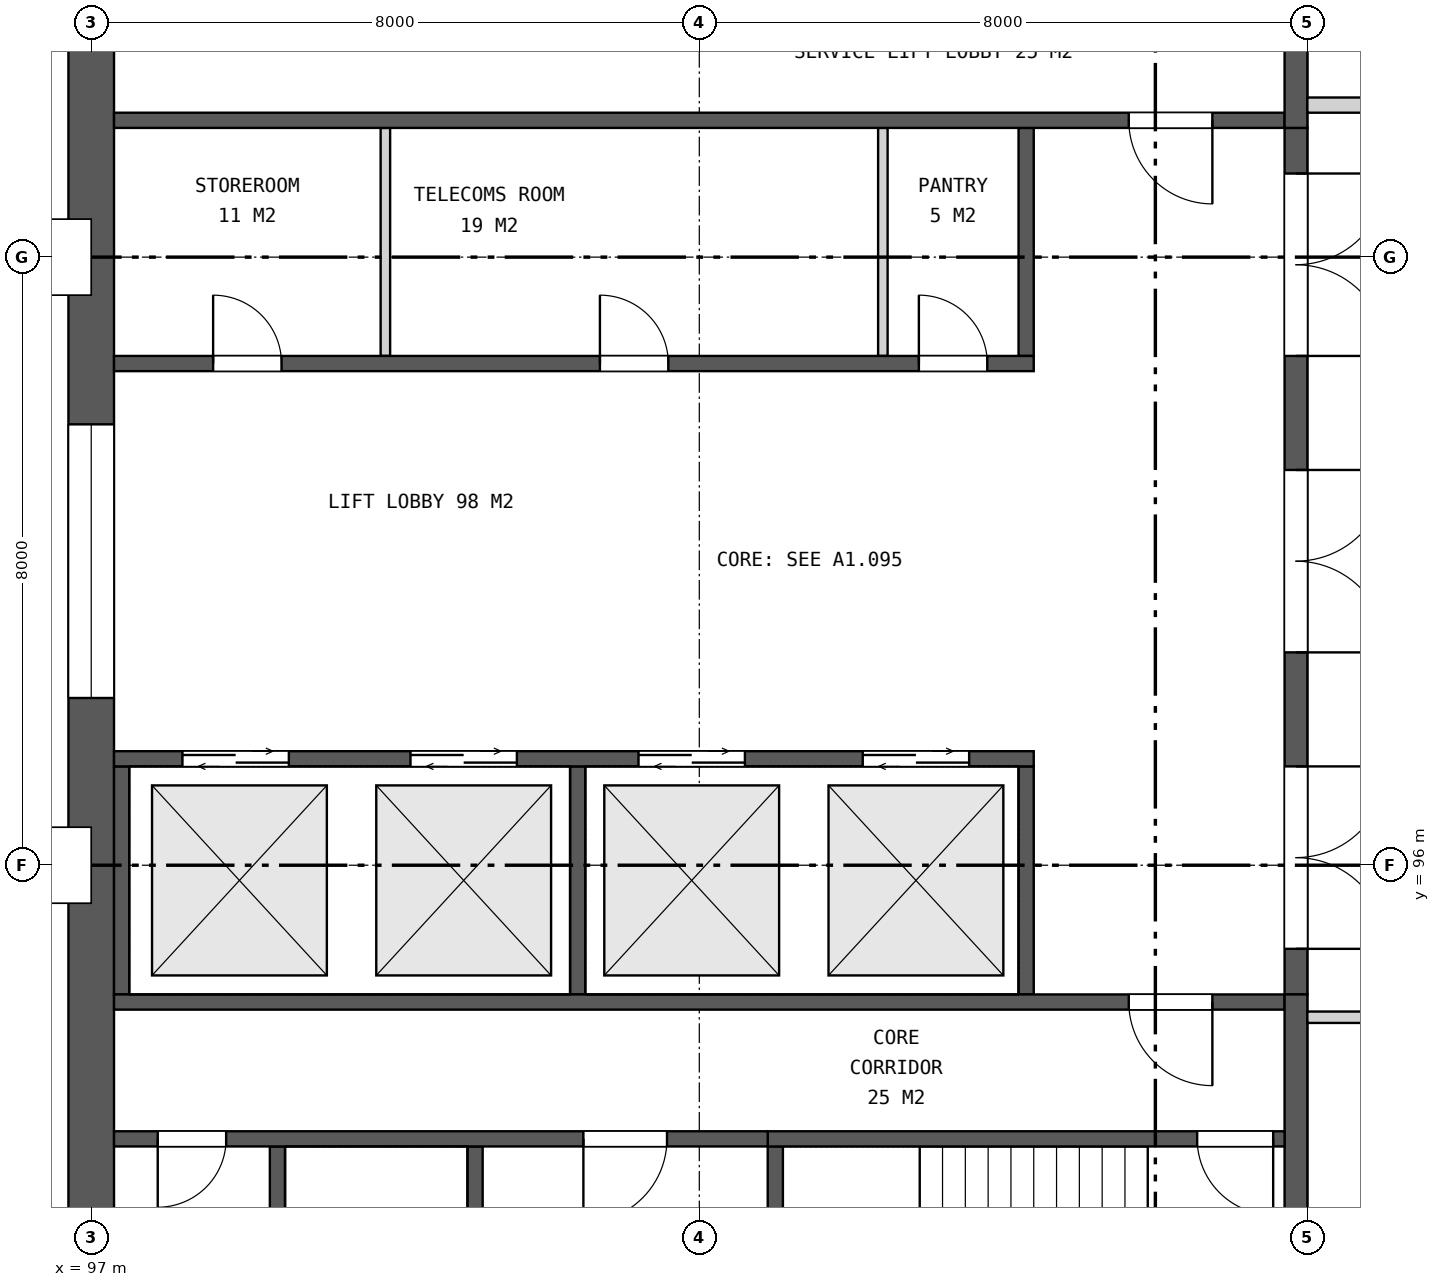
"""IFC4 building model, lengths in metres.
Left out: names, types, materials, properties, quantities, classifications, styles, units other than length and angle.
Written with IfcOpenShell. Run it as: python <this file> out.ifc"""

import sys

from ifc_helpers import new_model, si_unit, direction, frame, frame_2d, origin, place, context, subcontext, project, spatial, rectangle, extrude, element, fill, save


model = new_model("IFC4")
c1 = context("Model", 3, precision=1e-05, world=origin(), true_north=direction((0.0, 1.0)))
c2 = subcontext(c1, "Body", "Model", "MODEL_VIEW")
j1 = project(units=[si_unit("LENGTHUNIT", "METRE"), si_unit("PLANEANGLEUNIT", "RADIAN")], contexts=[c1])
p1 = place(None, origin())
s1 = spatial("IfcSite", under=j1, at=p1, CompositionType="ELEMENT")
p2 = place(p1, origin())
s2 = spatial("IfcBuilding", under=s1, at=p2, CompositionType="ELEMENT")
p3 = place(p2, frame((0.0, 0.0, 233.5)))
s3 = spatial("IfcBuildingStorey", under=s2, at=p3, CompositionType="ELEMENT", Elevation=233.5)
p4 = place(p3, frame((97.0, 111.7, 0.0), z_axis=(0.0, 0.0, 1.0), x_axis=(0.0, -1.0, 0.0)))
e1 = element("IfcWall", 1, at=p4, inside=s3, PredefinedType="SHEAR", context=c2, shape_type="SweptSolid", body=[
    extrude(rectangle(XDim=23.4, YDim=0.6, at=frame_2d((11.7, 0.0))), origin(), (0.0, 0.0, 1.0), 4.2),
])
p5 = place(p4, frame((9.9, 0.0, 0.15)))
e2 = element("IfcOpeningElement", 2, at=p5, cuts=e1, PredefinedType="OPENING", context=c2, shape_type="SweptSolid", body=[
    extrude(rectangle(XDim=3.6, YDim=3.0, at=frame_2d((1.8, 1.5))), frame((0.0, 0.31, 0.0), z_axis=(0.0, -1.0, 0.0), x_axis=(1.0, 0.0, 0.0)), (0.0, 0.0, 1.0), 0.62),
])
p6 = place(p3, frame((112.85, 105.7, 0.0), z_axis=(0.0, 0.0, 1.0), x_axis=(0.0, -1.0, 0.0)))
e3 = element("IfcWall", 3, at=p6, inside=s3, PredefinedType="SHEAR", context=c2, shape_type="SweptSolid", body=[
    extrude(rectangle(XDim=11.4, YDim=0.3, at=frame_2d((5.7, 0.0))), origin(), (0.0, 0.0, 1.0), 4.2),
])
p7 = place(p6, frame((0.6, 0.0, 0.0)))
e4 = element("IfcOpeningElement", 4, at=p7, cuts=e3, PredefinedType="OPENING", context=c2, shape_type="SweptSolid", body=[
    extrude(rectangle(XDim=2.4, YDim=2.4, at=frame_2d((1.2, 1.2))), frame((0.0, 0.16, 0.0), z_axis=(0.0, -1.0, 0.0), x_axis=(1.0, 0.0, 0.0)), (0.0, 0.0, 1.0), 0.32),
])
p8 = place(p6, frame((4.5, 0.0, 0.0)))
e5 = element("IfcOpeningElement", 5, at=p8, cuts=e3, PredefinedType="OPENING", context=c2, shape_type="SweptSolid", body=[
    extrude(rectangle(XDim=2.4, YDim=2.4, at=frame_2d((1.2, 1.2))), frame((0.0, 0.16, 0.0), z_axis=(0.0, -1.0, 0.0), x_axis=(1.0, 0.0, 0.0)), (0.0, 0.0, 1.0), 0.32),
])
p9 = place(p6, frame((8.4, 0.0, 0.0)))
e6 = element("IfcOpeningElement", 6, at=p9, cuts=e3, PredefinedType="OPENING", context=c2, shape_type="SweptSolid", body=[
    extrude(rectangle(XDim=2.4, YDim=2.4, at=frame_2d((1.2, 1.2))), frame((0.0, 0.16, 0.0), z_axis=(0.0, -1.0, 0.0), x_axis=(1.0, 0.0, 0.0)), (0.0, 0.0, 1.0), 0.32),
])
for number, where, z_axis, x_axis in (
    (7, (109.3, 97.3, 0.0), (0.0, 0.0, 1.0), (0.0, -1.0, 0.0)),
    (8, (103.4, 97.3, 0.0), (0.0, 0.0, 1.0), (0.0, -1.0, 0.0)),
    (9, (97.4, 97.3, 0.0), (0.0, 0.0, 1.0), (0.0, -1.0, 0.0)),
):
    element("IfcWall", number, at=place(p3, frame(where, z_axis=z_axis, x_axis=x_axis)), inside=s3, PredefinedType="SHEAR", context=c2, shape_type="SweptSolid", body=[
        extrude(rectangle(XDim=3.0, YDim=0.2, at=frame_2d((1.5, 0.0))), origin(), (0.0, 0.0, 1.0), 4.2),
    ])
p10 = place(p3, frame((109.4, 97.4, 0.0), z_axis=(0.0, 0.0, 1.0), x_axis=(-1.0, 0.0, 0.0)))
e10 = element("IfcWall", 10, at=p10, inside=s3, PredefinedType="SHEAR", context=c2, shape_type="SweptSolid", body=[
    extrude(rectangle(XDim=12.1, YDim=0.2, at=frame_2d((6.05, 0.0))), origin(), (0.0, 0.0, 1.0), 4.2),
])
p11 = place(p10, frame((0.85, 0.0, 0.0)))
e11 = element("IfcOpeningElement", 11, at=p11, cuts=e10, PredefinedType="OPENING", context=c2, shape_type="SweptSolid", body=[
    extrude(rectangle(XDim=1.4, YDim=2.1, at=frame_2d((0.7, 1.05))), frame((0.0, 0.11, 0.0), z_axis=(0.0, -1.0, 0.0), x_axis=(1.0, 0.0, 0.0)), (0.0, 0.0, 1.0), 0.22),
])
p12 = place(p10, frame((3.8, 0.0, 0.0)))
e12 = element("IfcOpeningElement", 12, at=p12, cuts=e10, PredefinedType="OPENING", context=c2, shape_type="SweptSolid", body=[
    extrude(rectangle(XDim=1.4, YDim=2.1, at=frame_2d((0.7, 1.05))), frame((0.0, 0.11, 0.0), z_axis=(0.0, -1.0, 0.0), x_axis=(1.0, 0.0, 0.0)), (0.0, 0.0, 1.0), 0.22),
])
p13 = place(p10, frame((6.8, 0.0, 0.0)))
e13 = element("IfcOpeningElement", 13, at=p13, cuts=e10, PredefinedType="OPENING", context=c2, shape_type="SweptSolid", body=[
    extrude(rectangle(XDim=1.4, YDim=2.1, at=frame_2d((0.7, 1.05))), frame((0.0, 0.11, 0.0), z_axis=(0.0, -1.0, 0.0), x_axis=(1.0, 0.0, 0.0)), (0.0, 0.0, 1.0), 0.22),
])
p14 = place(p10, frame((9.8, 0.0, 0.0)))
e14 = element("IfcOpeningElement", 14, at=p14, cuts=e10, PredefinedType="OPENING", context=c2, shape_type="SweptSolid", body=[
    extrude(rectangle(XDim=1.4, YDim=2.1, at=frame_2d((0.7, 1.05))), frame((0.0, 0.11, 0.0), z_axis=(0.0, -1.0, 0.0), x_axis=(1.0, 0.0, 0.0)), (0.0, 0.0, 1.0), 0.22),
])
p15 = place(p3, frame((109.3, 105.7, 0.0), z_axis=(0.0, 0.0, 1.0), x_axis=(0.0, -1.0, 0.0)))
e15 = element("IfcWall", 15, at=p15, inside=s3, PredefinedType="SHEAR", context=c2, shape_type="SweptSolid", body=[
    extrude(rectangle(XDim=3.0, YDim=0.2, at=frame_2d((1.5, 0.0))), origin(), (0.0, 0.0, 1.0), 4.2),
])
for number, where, z_axis, x_axis in (
    (16, (107.415, 105.7, 0.0), (0.0, 0.0, 1.0), (0.0, -1.0, 0.0)),
    (17, (100.87, 105.7, 0.0), (0.0, 0.0, 1.0), (0.0, -1.0, 0.0)),
):
    element("IfcWall", number, at=place(p3, frame(where, z_axis=z_axis, x_axis=x_axis)), inside=s3, PredefinedType="PARTITIONING", context=c2, shape_type="SweptSolid", body=[
        extrude(rectangle(XDim=3.0, YDim=0.125, at=frame_2d((1.5, 0.0))), origin(), (0.0, 0.0, 1.0), 4.2),
    ])
p16 = place(p3, frame((109.4, 102.6, 0.0), z_axis=(0.0, 0.0, 1.0), x_axis=(-1.0, 0.0, 0.0)))
e18 = element("IfcWall", 18, at=p16, inside=s3, PredefinedType="SHEAR", context=c2, shape_type="SweptSolid", body=[
    extrude(rectangle(XDim=12.1, YDim=0.2, at=frame_2d((6.05, 0.0))), origin(), (0.0, 0.0, 1.0), 4.2),
])
p17 = place(p16, frame((0.611, 0.0, 0.0)))
e19 = element("IfcOpeningElement", 19, at=p17, cuts=e18, PredefinedType="OPENING", context=c2, shape_type="SweptSolid", body=[
    extrude(rectangle(XDim=0.9, YDim=2.1, at=frame_2d((0.45, 1.05))), frame((0.0, 0.11, 0.0), z_axis=(0.0, -1.0, 0.0), x_axis=(1.0, 0.0, 0.0)), (0.0, 0.0, 1.0), 0.22),
])
p18 = place(p16, frame((4.808, 0.0, 0.0)))
e20 = element("IfcOpeningElement", 20, at=p18, cuts=e18, PredefinedType="OPENING", context=c2, shape_type="SweptSolid", body=[
    extrude(rectangle(XDim=0.9, YDim=2.1, at=frame_2d((0.45, 1.05))), frame((0.0, 0.11, 0.0), z_axis=(0.0, -1.0, 0.0), x_axis=(1.0, 0.0, 0.0)), (0.0, 0.0, 1.0), 0.22),
])
p19 = place(p16, frame((9.896, 0.0, 0.0)))
e21 = element("IfcOpeningElement", 21, at=p19, cuts=e18, PredefinedType="OPENING", context=c2, shape_type="SweptSolid", body=[
    extrude(rectangle(XDim=0.9, YDim=2.1, at=frame_2d((0.45, 1.05))), frame((0.0, 0.11, 0.0), z_axis=(0.0, -1.0, 0.0), x_axis=(1.0, 0.0, 0.0)), (0.0, 0.0, 1.0), 0.22),
])
p20 = place(p3, frame((112.7, 94.2, 0.0), z_axis=(0.0, 0.0, 1.0), x_axis=(-1.0, 0.0, 0.0)))
e22 = element("IfcWall", 22, at=p20, inside=s3, PredefinedType="SHEAR", context=c2, shape_type="SweptSolid", body=[
    extrude(rectangle(XDim=15.4, YDim=0.2, at=frame_2d((7.7, 0.0))), origin(), (0.0, 0.0, 1.0), 4.2),
])
p21 = place(p20, frame((0.95, 0.0, 0.0)))
e23 = element("IfcOpeningElement", 23, at=p21, cuts=e22, PredefinedType="OPENING", context=c2, shape_type="SweptSolid", body=[
    extrude(rectangle(XDim=1.1, YDim=2.1, at=frame_2d((0.55, 1.05))), frame((0.0, 0.11, 0.0), z_axis=(0.0, -1.0, 0.0), x_axis=(1.0, 0.0, 0.0)), (0.0, 0.0, 1.0), 0.22),
])
p22 = place(p3, frame((112.85, 94.3, 0.0), z_axis=(0.0, 0.0, 1.0), x_axis=(0.0, -1.0, 0.0)))
e24 = element("IfcWall", 24, at=p22, inside=s3, PredefinedType="SHEAR", context=c2, shape_type="SweptSolid", body=[
    extrude(rectangle(XDim=6.0, YDim=0.3, at=frame_2d((3.0, 0.0))), origin(), (0.0, 0.0, 1.0), 4.2),
])
p23 = place(p3, frame((106.0, 92.3, 0.0), z_axis=(0.0, 0.0, 1.0), x_axis=(0.0, -1.0, 0.0)))
e25 = element("IfcWall", 25, at=p23, inside=s3, PredefinedType="SHEAR", context=c2, shape_type="SweptSolid", body=[
    extrude(rectangle(XDim=4.0, YDim=0.2, at=frame_2d((2.0, 0.0))), origin(), (0.0, 0.0, 1.0), 4.2),
])
p24 = place(p3, frame((102.05, 92.3, 0.0), z_axis=(0.0, 0.0, 1.0), x_axis=(0.0, -1.0, 0.0)))
e26 = element("IfcWall", 26, at=p24, inside=s3, PredefinedType="SHEAR", context=c2, shape_type="SweptSolid", body=[
    extrude(rectangle(XDim=4.0, YDim=0.2, at=frame_2d((2.0, 0.0))), origin(), (0.0, 0.0, 1.0), 4.2),
])
p25 = place(p24, frame((1.4, 0.0, 0.0)))
e27 = element("IfcOpeningElement", 27, at=p25, cuts=e26, PredefinedType="OPENING", context=c2, shape_type="SweptSolid", body=[
    extrude(rectangle(XDim=1.2, YDim=2.1, at=frame_2d((0.6, 1.05))), frame((0.0, 0.11, 0.0), z_axis=(0.0, -1.0, 0.0), x_axis=(1.0, 0.0, 0.0)), (0.0, 0.0, 1.0), 0.22),
])
p26 = place(p3, frame((99.45, 92.3, 0.0), z_axis=(0.0, 0.0, 1.0), x_axis=(0.0, -1.0, 0.0)))
e28 = element("IfcWall", 28, at=p26, inside=s3, PredefinedType="SHEAR", context=c2, shape_type="SweptSolid", body=[
    extrude(rectangle(XDim=4.0, YDim=0.2, at=frame_2d((2.0, 0.0))), origin(), (0.0, 0.0, 1.0), 4.2),
])
p27 = place(p3, frame((112.7, 92.4, 0.0), z_axis=(0.0, 0.0, 1.0), x_axis=(-1.0, 0.0, 0.0)))
e29 = element("IfcWall", 29, at=p27, inside=s3, PredefinedType="SHEAR", context=c2, shape_type="SweptSolid", body=[
    extrude(rectangle(XDim=6.8, YDim=0.2, at=frame_2d((3.4, 0.0))), origin(), (0.0, 0.0, 1.0), 4.2),
])
p28 = place(p27, frame((0.15, 0.0, 0.0)))
e30 = element("IfcOpeningElement", 30, at=p28, cuts=e29, PredefinedType="OPENING", context=c2, shape_type="SweptSolid", body=[
    extrude(rectangle(XDim=1.0, YDim=2.1, at=frame_2d((0.5, 1.05))), frame((0.0, 0.11, 0.0), z_axis=(0.0, -1.0, 0.0), x_axis=(1.0, 0.0, 0.0)), (0.0, 0.0, 1.0), 0.22),
])
p29 = place(p3, frame((105.9, 92.4, 0.0), z_axis=(0.0, 0.0, 1.0), x_axis=(-1.0, 0.0, 0.0)))
e31 = element("IfcWall", 31, at=p29, inside=s3, PredefinedType="SHEAR", context=c2, shape_type="SweptSolid", body=[
    extrude(rectangle(XDim=8.6, YDim=0.2, at=frame_2d((4.3, 0.0))), origin(), (0.0, 0.0, 1.0), 4.2),
])
p30 = place(p29, frame((1.325, 0.0, 0.0)))
e32 = element("IfcOpeningElement", 32, at=p30, cuts=e31, PredefinedType="OPENING", context=c2, shape_type="SweptSolid", body=[
    extrude(rectangle(XDim=1.1, YDim=2.1, at=frame_2d((0.55, 1.05))), frame((0.0, 0.11, 0.0), z_axis=(0.0, -1.0, 0.0), x_axis=(1.0, 0.0, 0.0)), (0.0, 0.0, 1.0), 0.22),
])
p31 = place(p29, frame((7.125, 0.0, 0.0)))
e33 = element("IfcOpeningElement", 33, at=p31, cuts=e31, PredefinedType="OPENING", context=c2, shape_type="SweptSolid", body=[
    extrude(rectangle(XDim=0.9, YDim=2.1, at=frame_2d((0.45, 1.05))), frame((0.0, 0.11, 0.0), z_axis=(0.0, -1.0, 0.0), x_axis=(1.0, 0.0, 0.0)), (0.0, 0.0, 1.0), 0.22),
])
p32 = place(p3, frame((112.7, 105.8, 0.0), z_axis=(0.0, 0.0, 1.0), x_axis=(-1.0, 0.0, 0.0)))
e34 = element("IfcWall", 34, at=p32, inside=s3, PredefinedType="SHEAR", context=c2, shape_type="SweptSolid", body=[
    extrude(rectangle(XDim=15.4, YDim=0.2, at=frame_2d((7.7, 0.0))), origin(), (0.0, 0.0, 1.0), 4.2),
])
p33 = place(p32, frame((0.95, 0.0, 0.0)))
e35 = element("IfcOpeningElement", 35, at=p33, cuts=e34, PredefinedType="OPENING", context=c2, shape_type="SweptSolid", body=[
    extrude(rectangle(XDim=1.1, YDim=2.1, at=frame_2d((0.55, 1.05))), frame((0.0, 0.11, 0.0), z_axis=(0.0, -1.0, 0.0), x_axis=(1.0, 0.0, 0.0)), (0.0, 0.0, 1.0), 0.22),
])
p34 = place(p3, frame((112.85, 111.7, 0.0), z_axis=(0.0, 0.0, 1.0), x_axis=(0.0, -1.0, 0.0)))
e36 = element("IfcWall", 36, at=p34, inside=s3, PredefinedType="SHEAR", context=c2, shape_type="SweptSolid", body=[
    extrude(rectangle(XDim=6.0, YDim=0.3, at=frame_2d((3.0, 0.0))), origin(), (0.0, 0.0, 1.0), 4.2),
])
p35 = place(p3, frame((113.0, 94.0, 0.0), z_axis=(0.0, 0.0, 1.0), x_axis=(1.0, 0.0, 0.0)))
e37 = element("IfcWall", 37, at=p35, inside=s3, PredefinedType="PARTITIONING", context=c2, shape_type="SweptSolid", body=[
    extrude(rectangle(XDim=5.525, YDim=0.15, at=frame_2d((2.762, 0.0))), origin(), (0.0, 0.0, 1.0), 3.255),
])
p36 = place(p3, frame((113.0, 106.0, 0.0), z_axis=(0.0, 0.0, 1.0), x_axis=(1.0, 0.0, 0.0)))
e38 = element("IfcWall", 38, at=p36, inside=s3, PredefinedType="SOLIDWALL", context=c2, shape_type="SweptSolid", body=[
    extrude(rectangle(XDim=5.5, YDim=0.2, at=frame_2d((2.75, 0.0))), origin(), (0.0, 0.0, 1.0), 3.255),
])
p37 = place(p5, origin())
e39 = element("IfcWindow", 39, at=p37, inside=s3, PartitioningType="SINGLE_PANEL", PredefinedType="WINDOW", context=c2, shape_type="SweptSolid", body=[
    extrude(rectangle(XDim=3.6, YDim=3.0, at=frame_2d((1.8, 1.5))), frame((0.0, 0.03, 0.0), z_axis=(0.0, -1.0, 0.0), x_axis=(1.0, 0.0, 0.0)), (0.0, 0.0, 1.0), 0.06),
])
fill(e2, e39)
p38 = place(p7, origin())
e40 = element("IfcDoor", 40, at=p38, inside=s3, OperationType="DOUBLE_DOOR_SINGLE_SWING", PredefinedType="DOOR", context=c2, shape_type="SweptSolid", body=[
    extrude(rectangle(XDim=2.4, YDim=2.4, at=frame_2d((1.2, 1.2))), frame((0.0, 0.025, 0.0), z_axis=(0.0, -1.0, 0.0), x_axis=(1.0, 0.0, 0.0)), (0.0, 0.0, 1.0), 0.05),
])
fill(e4, e40)
p39 = place(p8, origin())
e41 = element("IfcDoor", 41, at=p39, inside=s3, OperationType="DOUBLE_DOOR_SINGLE_SWING", PredefinedType="DOOR", context=c2, shape_type="SweptSolid", body=[
    extrude(rectangle(XDim=2.4, YDim=2.4, at=frame_2d((1.2, 1.2))), frame((0.0, 0.025, 0.0), z_axis=(0.0, -1.0, 0.0), x_axis=(1.0, 0.0, 0.0)), (0.0, 0.0, 1.0), 0.05),
])
fill(e5, e41)
p40 = place(p9, origin())
e42 = element("IfcDoor", 42, at=p40, inside=s3, OperationType="DOUBLE_DOOR_SINGLE_SWING", PredefinedType="DOOR", context=c2, shape_type="SweptSolid", body=[
    extrude(rectangle(XDim=2.4, YDim=2.4, at=frame_2d((1.2, 1.2))), frame((0.0, 0.025, 0.0), z_axis=(0.0, -1.0, 0.0), x_axis=(1.0, 0.0, 0.0)), (0.0, 0.0, 1.0), 0.05),
])
fill(e6, e42)
p41 = place(p11, origin())
e43 = element("IfcDoor", 43, at=p41, inside=s3, OperationType="DOUBLE_DOOR_SLIDING", PredefinedType="DOOR", context=c2, shape_type="SweptSolid", body=[
    extrude(rectangle(XDim=1.4, YDim=2.1, at=frame_2d((0.7, 1.05))), frame((0.0, 0.025, 0.0), z_axis=(0.0, -1.0, 0.0), x_axis=(1.0, 0.0, 0.0)), (0.0, 0.0, 1.0), 0.05),
])
fill(e11, e43)
p42 = place(p12, origin())
e44 = element("IfcDoor", 44, at=p42, inside=s3, OperationType="DOUBLE_DOOR_SLIDING", PredefinedType="DOOR", context=c2, shape_type="SweptSolid", body=[
    extrude(rectangle(XDim=1.4, YDim=2.1, at=frame_2d((0.7, 1.05))), frame((0.0, 0.025, 0.0), z_axis=(0.0, -1.0, 0.0), x_axis=(1.0, 0.0, 0.0)), (0.0, 0.0, 1.0), 0.05),
])
fill(e12, e44)
p43 = place(p13, origin())
e45 = element("IfcDoor", 45, at=p43, inside=s3, OperationType="DOUBLE_DOOR_SLIDING", PredefinedType="DOOR", context=c2, shape_type="SweptSolid", body=[
    extrude(rectangle(XDim=1.4, YDim=2.1, at=frame_2d((0.7, 1.05))), frame((0.0, 0.025, 0.0), z_axis=(0.0, -1.0, 0.0), x_axis=(1.0, 0.0, 0.0)), (0.0, 0.0, 1.0), 0.05),
])
fill(e13, e45)
p44 = place(p14, origin())
e46 = element("IfcDoor", 46, at=p44, inside=s3, OperationType="DOUBLE_DOOR_SLIDING", PredefinedType="DOOR", context=c2, shape_type="SweptSolid", body=[
    extrude(rectangle(XDim=1.4, YDim=2.1, at=frame_2d((0.7, 1.05))), frame((0.0, 0.025, 0.0), z_axis=(0.0, -1.0, 0.0), x_axis=(1.0, 0.0, 0.0)), (0.0, 0.0, 1.0), 0.05),
])
fill(e14, e46)
p45 = place(p17, frame((0.9, 0.0, 0.0), z_axis=(0.0, 0.0, 1.0), x_axis=(-1.0, 0.0, 0.0)))
e47 = element("IfcDoor", 47, at=p45, inside=s3, OperationType="SINGLE_SWING_LEFT", PredefinedType="DOOR", context=c2, shape_type="SweptSolid", body=[
    extrude(rectangle(XDim=0.9, YDim=2.1, at=frame_2d((0.45, 1.05))), frame((0.0, 0.025, 0.0), z_axis=(0.0, -1.0, 0.0), x_axis=(1.0, 0.0, 0.0)), (0.0, 0.0, 1.0), 0.05),
])
fill(e19, e47)
p46 = place(p18, frame((0.9, 0.0, 0.0), z_axis=(0.0, 0.0, 1.0), x_axis=(-1.0, 0.0, 0.0)))
e48 = element("IfcDoor", 48, at=p46, inside=s3, OperationType="SINGLE_SWING_LEFT", PredefinedType="DOOR", context=c2, shape_type="SweptSolid", body=[
    extrude(rectangle(XDim=0.9, YDim=2.1, at=frame_2d((0.45, 1.05))), frame((0.0, 0.025, 0.0), z_axis=(0.0, -1.0, 0.0), x_axis=(1.0, 0.0, 0.0)), (0.0, 0.0, 1.0), 0.05),
])
fill(e20, e48)
p47 = place(p19, frame((0.9, 0.0, 0.0), z_axis=(0.0, 0.0, 1.0), x_axis=(-1.0, 0.0, 0.0)))
e49 = element("IfcDoor", 49, at=p47, inside=s3, OperationType="SINGLE_SWING_LEFT", PredefinedType="DOOR", context=c2, shape_type="SweptSolid", body=[
    extrude(rectangle(XDim=0.9, YDim=2.1, at=frame_2d((0.45, 1.05))), frame((0.0, 0.025, 0.0), z_axis=(0.0, -1.0, 0.0), x_axis=(1.0, 0.0, 0.0)), (0.0, 0.0, 1.0), 0.05),
])
fill(e21, e49)
p48 = place(p21, origin())
e50 = element("IfcDoor", 50, at=p48, inside=s3, OperationType="SINGLE_SWING_LEFT", PredefinedType="DOOR", context=c2, shape_type="SweptSolid", body=[
    extrude(rectangle(XDim=1.1, YDim=2.1, at=frame_2d((0.55, 1.05))), frame((0.0, 0.025, 0.0), z_axis=(0.0, -1.0, 0.0), x_axis=(1.0, 0.0, 0.0)), (0.0, 0.0, 1.0), 0.05),
])
fill(e23, e50)
p49 = place(p28, origin())
e51 = element("IfcDoor", 51, at=p49, inside=s3, OperationType="SINGLE_SWING_LEFT", PredefinedType="DOOR", context=c2, shape_type="SweptSolid", body=[
    extrude(rectangle(XDim=1.0, YDim=2.1, at=frame_2d((0.5, 1.05))), frame((0.0, 0.025, 0.0), z_axis=(0.0, -1.0, 0.0), x_axis=(1.0, 0.0, 0.0)), (0.0, 0.0, 1.0), 0.05),
])
fill(e30, e51)
p50 = place(p30, origin())
e52 = element("IfcDoor", 52, at=p50, inside=s3, OperationType="SINGLE_SWING_RIGHT", PredefinedType="DOOR", context=c2, shape_type="SweptSolid", body=[
    extrude(rectangle(XDim=1.1, YDim=2.1, at=frame_2d((0.55, 1.05))), frame((0.0, 0.025, 0.0), z_axis=(0.0, -1.0, 0.0), x_axis=(1.0, 0.0, 0.0)), (0.0, 0.0, 1.0), 0.05),
])
fill(e32, e52)
p51 = place(p31, origin())
e53 = element("IfcDoor", 53, at=p51, inside=s3, OperationType="SINGLE_SWING_RIGHT", PredefinedType="DOOR", context=c2, shape_type="SweptSolid", body=[
    extrude(rectangle(XDim=0.9, YDim=2.1, at=frame_2d((0.45, 1.05))), frame((0.0, 0.025, 0.0), z_axis=(0.0, -1.0, 0.0), x_axis=(1.0, 0.0, 0.0)), (0.0, 0.0, 1.0), 0.05),
])
fill(e33, e53)
p52 = place(p33, origin())
e54 = element("IfcDoor", 54, at=p52, inside=s3, OperationType="SINGLE_SWING_LEFT", PredefinedType="DOOR", context=c2, shape_type="SweptSolid", body=[
    extrude(rectangle(XDim=1.1, YDim=2.1, at=frame_2d((0.55, 1.05))), frame((0.0, 0.025, 0.0), z_axis=(0.0, -1.0, 0.0), x_axis=(1.0, 0.0, 0.0)), (0.0, 0.0, 1.0), 0.05),
])
fill(e35, e54)
save(model, sys.argv[1])
